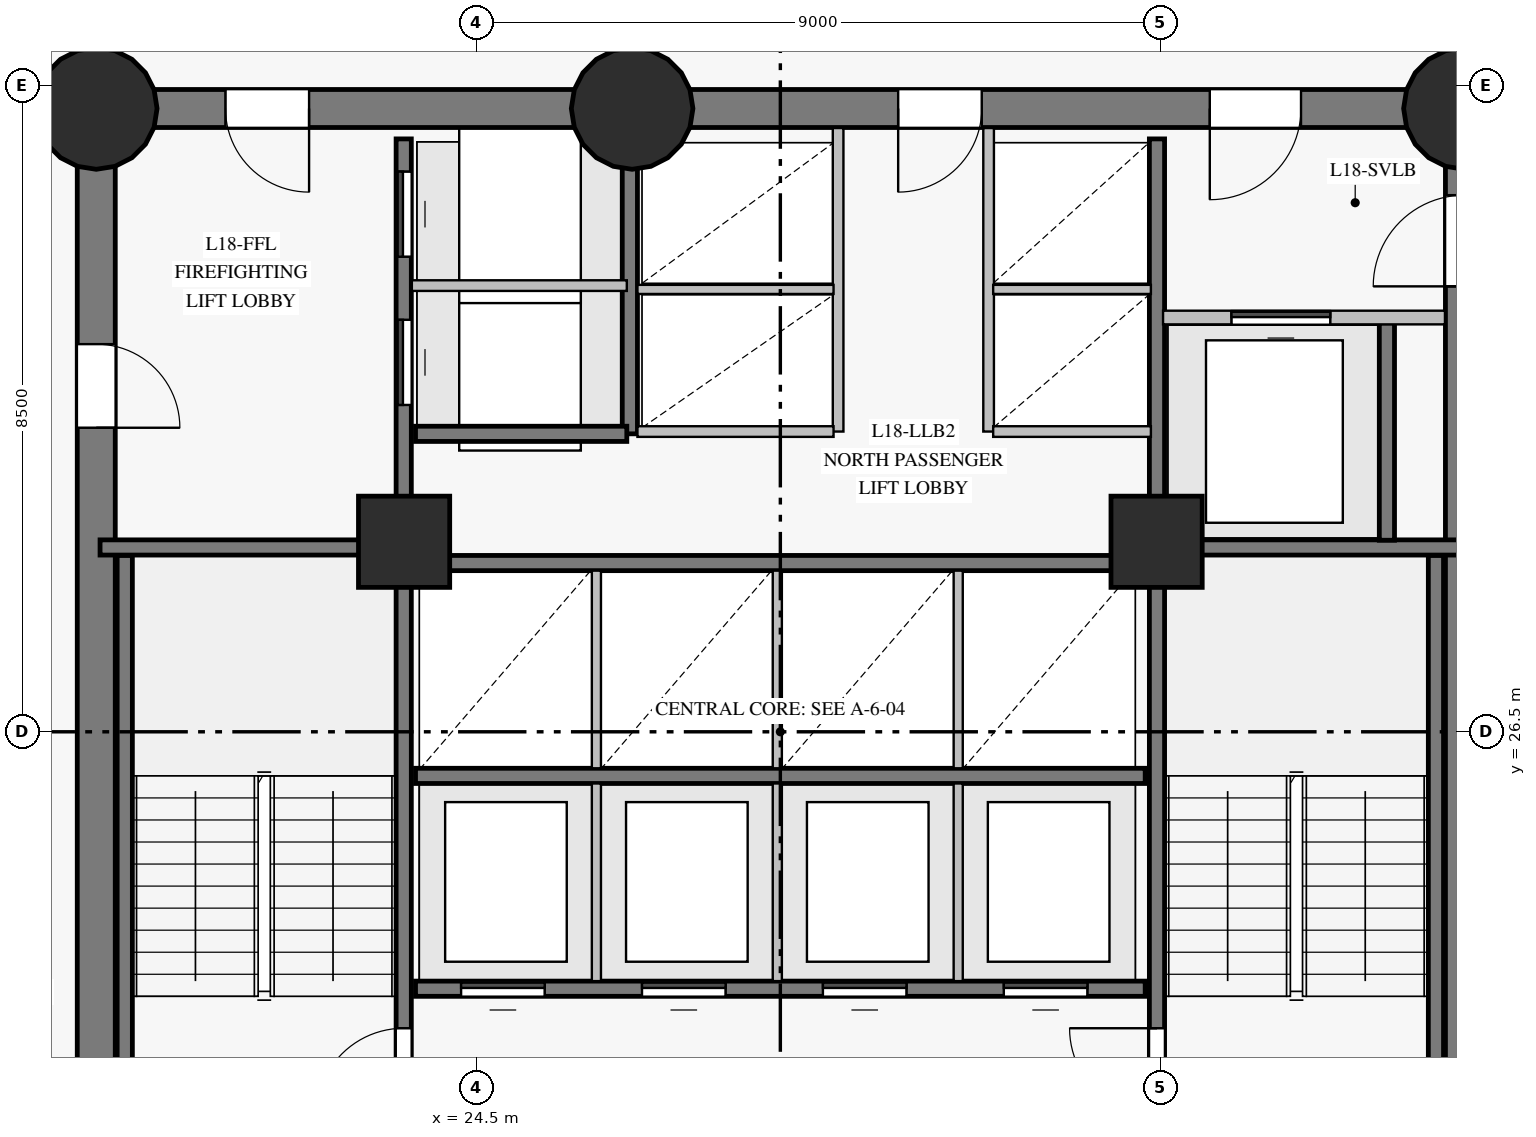
"""IFC4 building model, lengths in metres.
Left out: names, types, materials, properties, quantities, classifications, styles, units other than length and angle.
Written with IfcOpenShell. Run it as: python <this file> out.ifc"""

import sys

from ifc_helpers import new_model, si_unit, direction, frame, frame_2d, origin, origin_with_axes, origin_2d, place, context, subcontext, project, spatial, rectangle, circle, extrude, source, transform, mapped, element, fill, save


model = new_model("IFC4")
c1 = context("Model", 3, precision=1e-05, world=origin(), true_north=direction((0.0, 1.0)))
c2 = subcontext(c1, "Body", "Model", "MODEL_VIEW")
j1 = project(units=[si_unit("LENGTHUNIT", "METRE"), si_unit("PLANEANGLEUNIT", "RADIAN")], contexts=[c1])
p1 = place(None, origin())
s1 = spatial("IfcSite", under=j1, at=p1, CompositionType="ELEMENT")
p2 = place(p1, origin())
s2 = spatial("IfcBuilding", under=s1, at=p2, CompositionType="ELEMENT")
p3 = place(p2, frame((0.0, 0.0, 69.7)))
s3 = spatial("IfcBuildingStorey", under=s2, at=p3, CompositionType="ELEMENT", Elevation=69.7)
p4 = place(p3, frame((37.5, 18.3, 0.0), z_axis=(0.0, 0.0, 1.0), x_axis=(0.0, 1.0, 0.0)))
e1 = element("IfcWall", 1, at=p4, inside=s3, PredefinedType="SHEAR", context=c2, shape_type="SweptSolid", body=[
    extrude(rectangle(XDim=16.4, YDim=0.5, at=frame_2d((8.2, 0.0))), origin(), (0.0, 0.0, 1.0), 3.35),
])
p5 = place(p4, frame((14.06, 0.0, 0.0)))
e2 = element("IfcOpeningElement", 2, at=p5, cuts=e1, PredefinedType="OPENING", context=c2, shape_type="SweptSolid", body=[
    extrude(rectangle(XDim=1.2, YDim=2.15, at=frame_2d((0.6, 1.075))), frame((0.0, 0.26, 0.0), z_axis=(0.0, -1.0, 0.0), x_axis=(1.0, 0.0, 0.0)), (0.0, 0.0, 1.0), 0.52),
])
p6 = place(p3, frame((37.5, 34.7, 0.0), z_axis=(0.0, 0.0, 1.0), x_axis=(-1.0, 0.0, 0.0)))
e3 = element("IfcWall", 3, at=p6, inside=s3, PredefinedType="SHEAR", context=c2, shape_type="SweptSolid", body=[
    extrude(rectangle(XDim=10.95, YDim=0.5, at=frame_2d((5.475, 0.0))), origin(), (0.0, 0.0, 1.0), 3.35),
])
p7 = place(p6, frame((2.15, 0.0, 0.0)))
e4 = element("IfcOpeningElement", 4, at=p7, cuts=e3, PredefinedType="OPENING", context=c2, shape_type="SweptSolid", body=[
    extrude(rectangle(XDim=1.2, YDim=2.15, at=frame_2d((0.6, 1.075))), frame((0.0, 0.26, 0.0), z_axis=(0.0, -1.0, 0.0), x_axis=(1.0, 0.0, 0.0)), (0.0, 0.0, 1.0), 0.52),
])
p8 = place(p6, frame((6.35, 0.0, 0.0)))
e5 = element("IfcOpeningElement", 5, at=p8, cuts=e3, PredefinedType="OPENING", context=c2, shape_type="SweptSolid", body=[
    extrude(rectangle(XDim=1.1, YDim=2.15, at=frame_2d((0.55, 1.075))), frame((0.0, 0.26, 0.0), z_axis=(0.0, -1.0, 0.0), x_axis=(1.0, 0.0, 0.0)), (0.0, 0.0, 1.0), 0.52),
])
p9 = place(p3, frame((26.55, 34.7, 0.0), z_axis=(0.0, 0.0, 1.0), x_axis=(-1.0, 0.0, 0.0)))
e6 = element("IfcWall", 6, at=p9, inside=s3, PredefinedType="SHEAR", context=c2, shape_type="SweptSolid", body=[
    extrude(rectangle(XDim=7.05, YDim=0.5, at=frame_2d((3.525, 0.0))), origin(), (0.0, 0.0, 1.0), 3.35),
])
p10 = place(p9, frame((4.25, 0.0, 0.0)))
e7 = element("IfcOpeningElement", 7, at=p10, cuts=e6, PredefinedType="OPENING", context=c2, shape_type="SweptSolid", body=[
    extrude(rectangle(XDim=1.1, YDim=2.15, at=frame_2d((0.55, 1.075))), frame((0.0, 0.26, 0.0), z_axis=(0.0, -1.0, 0.0), x_axis=(1.0, 0.0, 0.0)), (0.0, 0.0, 1.0), 0.52),
])
p11 = place(p3, frame((19.5, 34.7, 0.0), z_axis=(0.0, 0.0, 1.0), x_axis=(0.0, -1.0, 0.0)))
e8 = element("IfcWall", 8, at=p11, inside=s3, PredefinedType="SHEAR", context=c2, shape_type="SweptSolid", body=[
    extrude(rectangle(XDim=16.4, YDim=0.5, at=frame_2d((8.2, 0.0))), origin(), (0.0, 0.0, 1.0), 3.35),
])
p12 = place(p11, frame((3.1, 0.0, 0.0)))
e9 = element("IfcOpeningElement", 9, at=p12, cuts=e8, PredefinedType="OPENING", context=c2, shape_type="SweptSolid", body=[
    extrude(rectangle(XDim=1.1, YDim=2.15, at=frame_2d((0.55, 1.075))), frame((0.0, 0.26, 0.0), z_axis=(0.0, -1.0, 0.0), x_axis=(1.0, 0.0, 0.0)), (0.0, 0.0, 1.0), 0.52),
])
m1 = source(origin_with_axes(), c2, "Body", "SweptSolid", [
    extrude(circle(Radius=0.8, at=origin_2d()), origin(), (0.0, 0.0, 1.0), 3.6),
])
for number, where, z_axis, x_axis in (
    (10, (19.5, 34.7, 0.0), (0.0, 0.0, 1.0), (1.0, 0.0, 0.0)),
    (11, (26.55, 34.7, 0.0), (0.0, 0.0, 1.0), (1.0, 0.0, 0.0)),
    (12, (37.5, 34.7, 0.0), (0.0, 0.0, 1.0), (1.0, 0.0, 0.0)),
):
    element("IfcColumn", number, at=place(p3, frame(where, z_axis=z_axis, x_axis=x_axis)), inside=s3, PredefinedType="COLUMN", context=c2, shape_type="MappedRepresentation", body=[
        mapped(m1, transform((0.0, 0.0, 0.0), scale=1.0)),
    ])
m2 = source(origin_with_axes(), c2, "Body", "SweptSolid", [
    extrude(rectangle(XDim=1.2, YDim=1.2, at=origin_2d()), origin(), (0.0, 0.0, 1.0), 3.6),
])
for number, where, z_axis, x_axis in (
    (13, (23.55, 29.0, 0.0), (0.0, 0.0, 1.0), (1.0, 0.0, 0.0)),
    (14, (33.45, 29.0, 0.0), (0.0, 0.0, 1.0), (1.0, 0.0, 0.0)),
):
    element("IfcColumn", number, at=place(p3, frame(where, z_axis=z_axis, x_axis=x_axis)), inside=s3, PredefinedType="COLUMN", context=c2, shape_type="MappedRepresentation", body=[
        mapped(m2, transform((0.0, 0.0, 0.0), scale=1.0)),
    ])
p13 = place(p3, frame((23.545, 18.7, 0.0), z_axis=(0.0, 0.0, 1.0), x_axis=(0.0, 1.0, 0.0)))
e15 = element("IfcWall", 15, at=p13, inside=s3, PredefinedType="SHEAR", context=c2, shape_type="SweptSolid", body=[
    extrude(rectangle(XDim=15.6, YDim=0.2, at=frame_2d((7.8, 0.0))), origin(), (0.0, 0.0, 1.0), 3.35),
])
p14 = place(p13, frame((2.75, 0.0, 0.0)))
e16 = element("IfcOpeningElement", 16, at=p14, cuts=e15, PredefinedType="OPENING", context=c2, shape_type="SweptSolid", body=[
    extrude(rectangle(XDim=1.15, YDim=2.15, at=frame_2d((0.575, 1.075))), frame((0.0, 0.11, 0.0), z_axis=(0.0, -1.0, 0.0), x_axis=(1.0, 0.0, 0.0)), (0.0, 0.0, 1.0), 0.22),
])
p15 = place(p13, frame((0.14, 0.0, 0.0)))
e17 = element("IfcOpeningElement", 17, at=p15, cuts=e15, PredefinedType="OPENING", context=c2, shape_type="SweptSolid", body=[
    extrude(rectangle(XDim=0.88, YDim=2.1, at=frame_2d((0.44, 1.05))), frame((0.0, 0.11, 0.0), z_axis=(0.0, -1.0, 0.0), x_axis=(1.0, 0.0, 0.0)), (0.0, 0.0, 1.0), 0.22),
])
p16 = place(p13, frame((1.36, 0.0, 0.0)))
e18 = element("IfcOpeningElement", 18, at=p16, cuts=e15, PredefinedType="OPENING", context=c2, shape_type="SweptSolid", body=[
    extrude(rectangle(XDim=0.88, YDim=2.1, at=frame_2d((0.44, 1.05))), frame((0.0, 0.11, 0.0), z_axis=(0.0, -1.0, 0.0), x_axis=(1.0, 0.0, 0.0)), (0.0, 0.0, 1.0), 0.22),
])
p17 = place(p13, frame((12.1, 0.0, 0.0)))
e19 = element("IfcOpeningElement", 19, at=p17, cuts=e15, PredefinedType="OPENING", context=c2, shape_type="SweptSolid", body=[
    extrude(rectangle(XDim=1.12, YDim=2.15, at=frame_2d((0.56, 1.075))), frame((0.0, 0.11, 0.0), z_axis=(0.0, -1.0, 0.0), x_axis=(1.0, 0.0, 0.0)), (0.0, 0.0, 1.0), 0.22),
])
p18 = place(p13, frame((14.05, 0.0, 0.0)))
e20 = element("IfcOpeningElement", 20, at=p18, cuts=e15, PredefinedType="OPENING", context=c2, shape_type="SweptSolid", body=[
    extrude(rectangle(XDim=1.12, YDim=2.15, at=frame_2d((0.56, 1.075))), frame((0.0, 0.11, 0.0), z_axis=(0.0, -1.0, 0.0), x_axis=(1.0, 0.0, 0.0)), (0.0, 0.0, 1.0), 0.22),
])
p19 = place(p3, frame((33.455, 18.7, 0.0), z_axis=(0.0, 0.0, 1.0), x_axis=(0.0, 1.0, 0.0)))
e21 = element("IfcWall", 21, at=p19, inside=s3, PredefinedType="SHEAR", context=c2, shape_type="SweptSolid", body=[
    extrude(rectangle(XDim=15.6, YDim=0.2, at=frame_2d((7.8, 0.0))), origin(), (0.0, 0.0, 1.0), 3.35),
])
p20 = place(p19, frame((2.75, 0.0, 0.0)))
e22 = element("IfcOpeningElement", 22, at=p20, cuts=e21, PredefinedType="OPENING", context=c2, shape_type="SweptSolid", body=[
    extrude(rectangle(XDim=1.15, YDim=2.15, at=frame_2d((0.575, 1.075))), frame((0.0, 0.11, 0.0), z_axis=(0.0, -1.0, 0.0), x_axis=(1.0, 0.0, 0.0)), (0.0, 0.0, 1.0), 0.22),
])
p21 = place(p19, frame((0.55, 0.0, 0.0)))
e23 = element("IfcOpeningElement", 23, at=p21, cuts=e21, PredefinedType="OPENING", context=c2, shape_type="SweptSolid", body=[
    extrude(rectangle(XDim=0.94, YDim=2.1, at=frame_2d((0.47, 1.05))), frame((0.0, 0.11, 0.0), z_axis=(0.0, -1.0, 0.0), x_axis=(1.0, 0.0, 0.0)), (0.0, 0.0, 1.0), 0.22),
])
p22 = place(p3, frame((23.7, 23.12, 0.0), z_axis=(0.0, 0.0, 1.0), x_axis=(1.0, 0.0, 0.0)))
e24 = element("IfcWall", 24, at=p22, inside=s3, PredefinedType="SHEAR", context=c2, shape_type="SweptSolid", body=[
    extrude(rectangle(XDim=9.6, YDim=0.2, at=frame_2d((4.8, 0.0))), origin(), (0.0, 0.0, 1.0), 3.35),
])
p23 = place(p22, frame((0.6, 0.0, 0.0)))
e25 = element("IfcOpeningElement", 25, at=p23, cuts=e24, PredefinedType="OPENING", context=c2, shape_type="SweptSolid", body=[
    extrude(rectangle(XDim=1.1, YDim=2.15, at=frame_2d((0.55, 1.075))), frame((0.0, 0.11, 0.0), z_axis=(0.0, -1.0, 0.0), x_axis=(1.0, 0.0, 0.0)), (0.0, 0.0, 1.0), 0.22),
])
p24 = place(p22, frame((2.98, 0.0, 0.0)))
e26 = element("IfcOpeningElement", 26, at=p24, cuts=e24, PredefinedType="OPENING", context=c2, shape_type="SweptSolid", body=[
    extrude(rectangle(XDim=1.1, YDim=2.15, at=frame_2d((0.55, 1.075))), frame((0.0, 0.11, 0.0), z_axis=(0.0, -1.0, 0.0), x_axis=(1.0, 0.0, 0.0)), (0.0, 0.0, 1.0), 0.22),
])
p25 = place(p22, frame((5.36, 0.0, 0.0)))
e27 = element("IfcOpeningElement", 27, at=p25, cuts=e24, PredefinedType="OPENING", context=c2, shape_type="SweptSolid", body=[
    extrude(rectangle(XDim=1.1, YDim=2.15, at=frame_2d((0.55, 1.075))), frame((0.0, 0.11, 0.0), z_axis=(0.0, -1.0, 0.0), x_axis=(1.0, 0.0, 0.0)), (0.0, 0.0, 1.0), 0.22),
])
p26 = place(p22, frame((7.74, 0.0, 0.0)))
e28 = element("IfcOpeningElement", 28, at=p26, cuts=e24, PredefinedType="OPENING", context=c2, shape_type="SweptSolid", body=[
    extrude(rectangle(XDim=1.1, YDim=2.15, at=frame_2d((0.55, 1.075))), frame((0.0, 0.11, 0.0), z_axis=(0.0, -1.0, 0.0), x_axis=(1.0, 0.0, 0.0)), (0.0, 0.0, 1.0), 0.22),
])
for number, where, z_axis, x_axis in (
    (29, (23.7, 25.92, 0.0), (0.0, 0.0, 1.0), (1.0, 0.0, 0.0)),
    (30, (23.7, 28.72, 0.0), (0.0, 0.0, 1.0), (1.0, 0.0, 0.0)),
):
    element("IfcWall", number, at=place(p3, frame(where, z_axis=z_axis, x_axis=x_axis)), inside=s3, PredefinedType="SHEAR", context=c2, shape_type="SweptSolid", body=[
        extrude(rectangle(XDim=9.6, YDim=0.2, at=frame_2d((4.8, 0.0))), origin(), (0.0, 0.0, 1.0), 3.35),
    ])
for number, where, z_axis, x_axis in (
    (31, (19.875, 21.32, 0.0), (0.0, 0.0, 1.0), (0.0, 1.0, 0.0)),
    (32, (37.125, 21.32, 0.0), (0.0, 0.0, 1.0), (0.0, 1.0, 0.0)),
):
    element("IfcWall", number, at=place(p3, frame(where, z_axis=z_axis, x_axis=x_axis)), inside=s3, PredefinedType="SHEAR", context=c2, shape_type="SweptSolid", body=[
        extrude(rectangle(XDim=7.5, YDim=0.2, at=frame_2d((3.75, 0.0))), origin(), (0.0, 0.0, 1.0), 3.35),
    ])
for number, where, z_axis, x_axis in (
    (33, (33.455, 28.925, 0.0), (0.0, 0.0, 1.0), (1.0, 0.0, 0.0)),
    (34, (19.55, 28.925, 0.0), (0.0, 0.0, 1.0), (1.0, 0.0, 0.0)),
):
    element("IfcWall", number, at=place(p3, frame(where, z_axis=z_axis, x_axis=x_axis)), inside=s3, PredefinedType="SHEAR", context=c2, shape_type="SweptSolid", body=[
        extrude(rectangle(XDim=3.995, YDim=0.2, at=frame_2d((1.998, 0.0))), origin(), (0.0, 0.0, 1.0), 3.35),
    ])
p27 = place(p3, frame((26.52, 30.42, 0.0), z_axis=(0.0, 0.0, 1.0), x_axis=(0.0, 1.0, 0.0)))
e35 = element("IfcWall", 35, at=p27, inside=s3, PredefinedType="SHEAR", context=c2, shape_type="SweptSolid", body=[
    extrude(rectangle(XDim=3.86, YDim=0.2, at=frame_2d((1.93, 0.0))), origin(), (0.0, 0.0, 1.0), 3.35),
])
p28 = place(p3, frame((36.48, 29.02, 0.0), z_axis=(0.0, 0.0, 1.0), x_axis=(0.0, 1.0, 0.0)))
e36 = element("IfcWall", 36, at=p28, inside=s3, PredefinedType="SHEAR", context=c2, shape_type="SweptSolid", body=[
    extrude(rectangle(XDim=2.86, YDim=0.2, at=frame_2d((1.43, 0.0))), origin(), (0.0, 0.0, 1.0), 3.35),
])
p29 = place(p3, frame((23.7, 30.42, 0.0), z_axis=(0.0, 0.0, 1.0), x_axis=(1.0, 0.0, 0.0)))
e37 = element("IfcWall", 37, at=p29, inside=s3, PredefinedType="SHEAR", context=c2, shape_type="SweptSolid", body=[
    extrude(rectangle(XDim=2.78, YDim=0.2, at=frame_2d((1.39, 0.0))), origin(), (0.0, 0.0, 1.0), 3.35),
])
for number, where, z_axis, x_axis in (
    (38, (29.26, 30.45, 0.0), (0.0, 0.0, 1.0), (0.0, 1.0, 0.0)),
    (39, (31.24, 30.45, 0.0), (0.0, 0.0, 1.0), (0.0, 1.0, 0.0)),
):
    element("IfcWall", number, at=place(p3, frame(where, z_axis=z_axis, x_axis=x_axis)), inside=s3, PredefinedType="PARTITIONING", context=c2, shape_type="SweptSolid", body=[
        extrude(rectangle(XDim=3.993, YDim=0.14, at=frame_2d((1.997, 0.0))), origin(), (0.0, 0.0, 1.0), 3.35),
    ])
p30 = place(p3, frame((33.535, 31.95, 0.0), z_axis=(0.0, 0.0, 1.0), x_axis=(1.0, 0.0, 0.0)))
e40 = element("IfcWall", 40, at=p30, inside=s3, PredefinedType="PARTITIONING", context=c2, shape_type="SweptSolid", body=[
    extrude(rectangle(XDim=3.709, YDim=0.18, at=frame_2d((1.854, 0.0))), origin(), (0.0, 0.0, 1.0), 3.35),
])
p31 = place(p30, frame((0.9, 0.0, 0.0)))
e41 = element("IfcOpeningElement", 41, at=p31, cuts=e40, PredefinedType="OPENING", context=c2, shape_type="SweptSolid", body=[
    extrude(rectangle(XDim=1.3, YDim=2.2, at=frame_2d((0.65, 1.1))), frame((0.0, 0.1, 0.0), z_axis=(0.0, -1.0, 0.0), x_axis=(1.0, 0.0, 0.0)), (0.0, 0.0, 1.0), 0.2),
])
p32 = place(p3, frame((23.652, 32.37, 0.0), z_axis=(0.0, 0.0, 1.0), x_axis=(1.0, 0.0, 0.0)))
e42 = element("IfcWall", 42, at=p32, inside=s3, PredefinedType="PARTITIONING", context=c2, shape_type="SweptSolid", body=[
    extrude(rectangle(XDim=2.828, YDim=0.14, at=frame_2d((1.414, 0.0))), origin(), (0.0, 0.0, 1.0), 3.35),
])
for number, where, z_axis, x_axis in (
    (43, (26.08, 23.22, 0.0), (0.0, 0.0, 1.0), (0.0, 1.0, 0.0)),
    (44, (28.46, 23.22, 0.0), (0.0, 0.0, 1.0), (0.0, 1.0, 0.0)),
    (45, (30.84, 23.22, 0.0), (0.0, 0.0, 1.0), (0.0, 1.0, 0.0)),
    (46, (26.08, 26.02, 0.0), (0.0, 0.0, 1.0), (0.0, 1.0, 0.0)),
    (47, (28.46, 26.02, 0.0), (0.0, 0.0, 1.0), (0.0, 1.0, 0.0)),
    (48, (30.84, 26.02, 0.0), (0.0, 0.0, 1.0), (0.0, 1.0, 0.0)),
):
    element("IfcWall", number, at=place(p3, frame(where, z_axis=z_axis, x_axis=x_axis)), inside=s3, PredefinedType="PARTITIONING", context=c2, shape_type="SweptSolid", body=[
        extrude(rectangle(XDim=2.6, YDim=0.12, at=frame_2d((1.3, 0.0))), origin(), (0.0, 0.0, 1.0), 3.35),
    ])
p33 = place(p3, frame((26.62, 30.45, 0.0), z_axis=(0.0, 0.0, 1.0), x_axis=(1.0, 0.0, 0.0)))
e49 = element("IfcWall", 49, at=p33, inside=s3, PredefinedType="PARTITIONING", context=c2, shape_type="SweptSolid", body=[
    extrude(rectangle(XDim=2.58, YDim=0.14, at=frame_2d((1.29, 0.0))), origin(), (0.0, 0.0, 1.0), 3.35),
])
p34 = place(p3, frame((26.62, 32.32, 0.0), z_axis=(0.0, 0.0, 1.0), x_axis=(1.0, 0.0, 0.0)))
e50 = element("IfcWall", 50, at=p34, inside=s3, PredefinedType="PARTITIONING", context=c2, shape_type="SweptSolid", body=[
    extrude(rectangle(XDim=2.58, YDim=0.12, at=frame_2d((1.29, 0.0))), origin(), (0.0, 0.0, 1.0), 3.35),
])
p35 = place(p3, frame((31.3, 30.45, 0.0), z_axis=(0.0, 0.0, 1.0), x_axis=(1.0, 0.0, 0.0)))
e51 = element("IfcWall", 51, at=p35, inside=s3, PredefinedType="PARTITIONING", context=c2, shape_type="SweptSolid", body=[
    extrude(rectangle(XDim=2.075, YDim=0.14, at=frame_2d((1.038, 0.0))), origin(), (0.0, 0.0, 1.0), 3.35),
])
p36 = place(p3, frame((31.3, 32.32, 0.0), z_axis=(0.0, 0.0, 1.0), x_axis=(1.0, 0.0, 0.0)))
e52 = element("IfcWall", 52, at=p36, inside=s3, PredefinedType="PARTITIONING", context=c2, shape_type="SweptSolid", body=[
    extrude(rectangle(XDim=2.075, YDim=0.12, at=frame_2d((1.038, 0.0))), origin(), (0.0, 0.0, 1.0), 3.35),
])
m3 = source(origin_with_axes(), c2, "Body", "SweptSolid", [
    extrude(rectangle(XDim=1.15, YDim=2.15, at=frame_2d((0.575, 1.075))), frame((0.0, 0.025, 0.0), z_axis=(0.0, -1.0, 0.0), x_axis=(1.0, 0.0, 0.0)), (0.0, 0.0, 1.0), 0.05),
])
p37 = place(p14, origin())
e53 = element("IfcDoor", 53, at=p37, inside=s3, OperationType="SINGLE_SWING_LEFT", PredefinedType="DOOR", context=c2, shape_type="MappedRepresentation", body=[
    mapped(m3, transform((0.0, 0.0, 0.0), scale=1.0)),
])
fill(e16, e53)
p38 = place(p20, origin())
e54 = element("IfcDoor", 54, at=p38, inside=s3, OperationType="SINGLE_SWING_RIGHT", PredefinedType="DOOR", context=c2, shape_type="MappedRepresentation", body=[
    mapped(m3, transform((0.0, 0.0, 0.0), scale=1.0)),
])
fill(e22, e54)
m4 = source(origin_with_axes(), c2, "Body", "SweptSolid", [
    extrude(rectangle(XDim=1.1, YDim=2.15, at=frame_2d((0.55, 1.075))), frame((0.0, 0.025, 0.0), z_axis=(0.0, -1.0, 0.0), x_axis=(1.0, 0.0, 0.0)), (0.0, 0.0, 1.0), 0.05),
])
p39 = place(p10, origin())
e55 = element("IfcDoor", 55, at=p39, inside=s3, OperationType="SINGLE_SWING_LEFT", PredefinedType="DOOR", context=c2, shape_type="MappedRepresentation", body=[
    mapped(m4, transform((0.0, 0.0, 0.0), scale=1.0)),
])
fill(e7, e55)
p40 = place(p12, origin())
e56 = element("IfcDoor", 56, at=p40, inside=s3, OperationType="SINGLE_SWING_RIGHT", PredefinedType="DOOR", context=c2, shape_type="MappedRepresentation", body=[
    mapped(m4, transform((0.0, 0.0, 0.0), scale=1.0)),
])
fill(e9, e56)
m5 = source(origin_with_axes(), c2, "Body", "SweptSolid", [
    extrude(rectangle(XDim=1.2, YDim=2.15, at=frame_2d((0.6, 1.075))), frame((0.0, 0.025, 0.0), z_axis=(0.0, -1.0, 0.0), x_axis=(1.0, 0.0, 0.0)), (0.0, 0.0, 1.0), 0.05),
])
p41 = place(p7, origin())
e57 = element("IfcDoor", 57, at=p41, inside=s3, OperationType="SINGLE_SWING_RIGHT", PredefinedType="DOOR", context=c2, shape_type="MappedRepresentation", body=[
    mapped(m5, transform((0.0, 0.0, 0.0), scale=1.0)),
])
fill(e4, e57)
m6 = source(origin_with_axes(), c2, "Body", "SweptSolid", [
    extrude(rectangle(XDim=1.3, YDim=2.2, at=frame_2d((0.65, 1.1))), frame((0.0, 0.025, 0.0), z_axis=(0.0, -1.0, 0.0), x_axis=(1.0, 0.0, 0.0)), (0.0, 0.0, 1.0), 0.05),
])
p42 = place(p31, origin())
e58 = element("IfcDoor", 58, at=p42, inside=s3, OperationType="SLIDING_TO_LEFT", PredefinedType="DOOR", context=c2, shape_type="MappedRepresentation", body=[
    mapped(m6, transform((0.0, 0.0, 0.0), scale=1.0)),
])
fill(e41, e58)
p43 = place(p23, origin())
e59 = element("IfcDoor", 59, at=p43, inside=s3, OperationType="SLIDING_TO_LEFT", PredefinedType="DOOR", context=c2, shape_type="MappedRepresentation", body=[
    mapped(m4, transform((0.0, 0.0, 0.0), scale=1.0)),
])
fill(e25, e59)
p44 = place(p24, origin())
e60 = element("IfcDoor", 60, at=p44, inside=s3, OperationType="SLIDING_TO_RIGHT", PredefinedType="DOOR", context=c2, shape_type="MappedRepresentation", body=[
    mapped(m4, transform((0.0, 0.0, 0.0), scale=1.0)),
])
fill(e26, e60)
p45 = place(p25, origin())
e61 = element("IfcDoor", 61, at=p45, inside=s3, OperationType="SLIDING_TO_LEFT", PredefinedType="DOOR", context=c2, shape_type="MappedRepresentation", body=[
    mapped(m4, transform((0.0, 0.0, 0.0), scale=1.0)),
])
fill(e27, e61)
p46 = place(p26, origin())
e62 = element("IfcDoor", 62, at=p46, inside=s3, OperationType="SLIDING_TO_RIGHT", PredefinedType="DOOR", context=c2, shape_type="MappedRepresentation", body=[
    mapped(m4, transform((0.0, 0.0, 0.0), scale=1.0)),
])
fill(e28, e62)
p47 = place(p8, origin())
e63 = element("IfcDoor", 63, at=p47, inside=s3, OperationType="SINGLE_SWING_RIGHT", PredefinedType="DOOR", context=c2, shape_type="MappedRepresentation", body=[
    mapped(m4, transform((0.0, 0.0, 0.0), scale=1.0)),
])
fill(e5, e63)
m7 = source(origin_with_axes(), c2, "Body", "SweptSolid", [
    extrude(rectangle(XDim=1.12, YDim=2.15, at=frame_2d((0.56, 1.075))), frame((0.0, 0.025, 0.0), z_axis=(0.0, -1.0, 0.0), x_axis=(1.0, 0.0, 0.0)), (0.0, 0.0, 1.0), 0.05),
])
p48 = place(p17, origin())
e64 = element("IfcDoor", 64, at=p48, inside=s3, OperationType="SLIDING_TO_LEFT", PredefinedType="DOOR", context=c2, shape_type="MappedRepresentation", body=[
    mapped(m7, transform((0.0, 0.0, 0.0), scale=1.0)),
])
fill(e19, e64)
p49 = place(p18, origin())
e65 = element("IfcDoor", 65, at=p49, inside=s3, OperationType="SLIDING_TO_RIGHT", PredefinedType="DOOR", context=c2, shape_type="MappedRepresentation", body=[
    mapped(m7, transform((0.0, 0.0, 0.0), scale=1.0)),
])
fill(e20, e65)
save(model, sys.argv[1])
